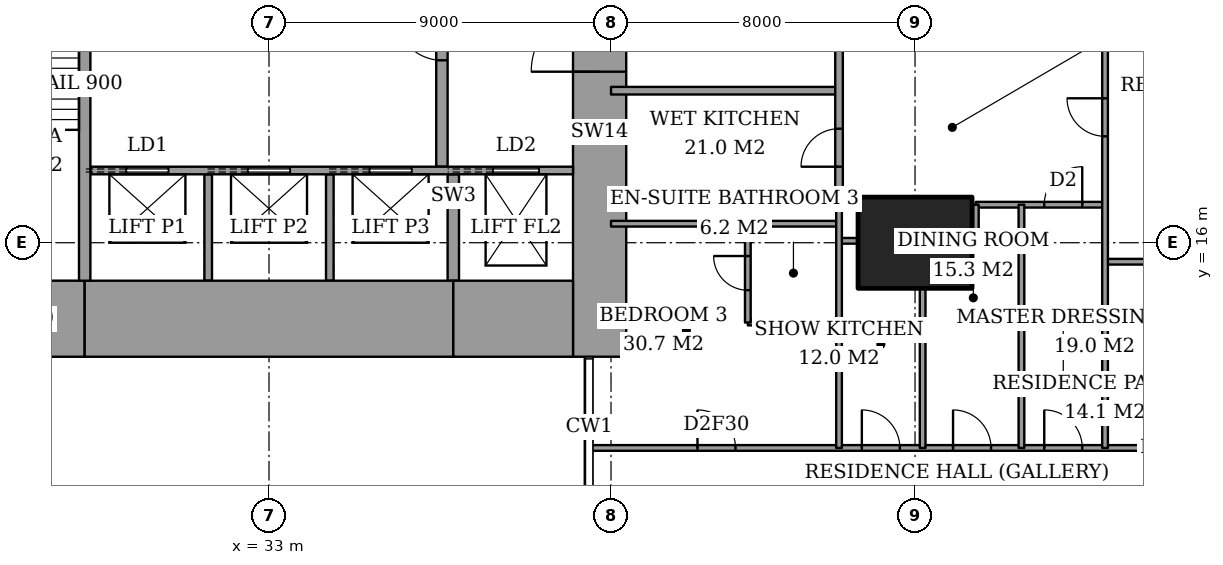
"""IFC4 building model, lengths in metres.
Left out: names, types, materials, properties, quantities, classifications, styles, units other than length and angle.
Written with IfcOpenShell. Run it as: python <this file> out.ifc"""

import sys

from ifc_helpers import new_model, si_unit, direction, frame, frame_2d, origin, origin_2d, place, context, subcontext, project, spatial, rectangle, extrude, element, fill, save


model = new_model("IFC4")
c1 = context("Model", 3, precision=1e-05, world=origin(), true_north=direction((0.0, 1.0)))
c2 = subcontext(c1, "Body", "Model", "MODEL_VIEW")
j1 = project(units=[si_unit("LENGTHUNIT", "METRE"), si_unit("PLANEANGLEUNIT", "RADIAN")], contexts=[c1])
p1 = place(None, origin())
s1 = spatial("IfcSite", under=j1, at=p1, CompositionType="ELEMENT")
p2 = place(p1, origin())
s2 = spatial("IfcBuilding", under=s1, at=p2, CompositionType="ELEMENT")
p3 = place(p2, frame((0.0, 0.0, 65.6)))
s3 = spatial("IfcBuildingStorey", under=s2, at=p3, CompositionType="ELEMENT", Elevation=65.6)
p4 = place(p3, frame((50.0, 16.0, 0.0), z_axis=(0.0, 0.0, 1.0), x_axis=(1.0, 0.0, 0.0)))
e1 = element("IfcColumn", 1, at=p4, inside=s3, PredefinedType="COLUMN", context=c2, shape_type="SweptSolid", body=[
    extrude(rectangle(XDim=3.0, YDim=2.4, at=origin_2d()), origin(), (0.0, 0.0, 1.0), 3.6),
])
p5 = place(p3, frame((25.0, 14.0, 0.0), z_axis=(0.0, 0.0, 1.0), x_axis=(1.0, 0.0, 0.0)))
e2 = element("IfcWall", 2, at=p5, inside=s3, PredefinedType="SHEAR", context=c2, shape_type="SweptSolid", body=[
    extrude(rectangle(XDim=3.15, YDim=2.0, at=frame_2d((1.575, 0.0))), origin(), (0.0, 0.0, 1.0), 3.6),
])
p6 = place(p3, frame((28.15, 14.0, 0.0), z_axis=(0.0, 0.0, 1.0), x_axis=(1.0, 0.0, 0.0)))
e3 = element("IfcWall", 3, at=p6, inside=s3, PredefinedType="SHEAR", context=c2, shape_type="SweptSolid", body=[
    extrude(rectangle(XDim=9.7, YDim=2.0, at=frame_2d((4.85, 0.0))), origin(), (0.0, 0.0, 1.0), 3.6),
])
p7 = place(p3, frame((37.85, 14.0, 0.0), z_axis=(0.0, 0.0, 1.0), x_axis=(1.0, 0.0, 0.0)))
e4 = element("IfcWall", 4, at=p7, inside=s3, PredefinedType="SHEAR", context=c2, shape_type="SweptSolid", body=[
    extrude(rectangle(XDim=3.15, YDim=2.0, at=frame_2d((1.575, 0.0))), origin(), (0.0, 0.0, 1.0), 3.6),
])
p8 = place(p3, frame((41.7, 13.0, 0.0), z_axis=(0.0, 0.0, 1.0), x_axis=(0.0, 1.0, 0.0)))
e5 = element("IfcWall", 5, at=p8, inside=s3, PredefinedType="SHEAR", context=c2, shape_type="SweptSolid", body=[
    extrude(rectangle(XDim=11.85, YDim=1.4, at=frame_2d((5.925, 0.0))), origin(), (0.0, 0.0, 1.0), 3.6),
])
p9 = place(p8, frame((7.5, 0.0, 0.0)))
e6 = element("IfcOpeningElement", 6, at=p9, cuts=e5, PredefinedType="OPENING", context=c2, shape_type="SweptSolid", body=[
    extrude(rectangle(XDim=1.8, YDim=2.4, at=frame_2d((0.9, 1.2))), frame((0.0, 0.71, 0.0), z_axis=(0.0, -1.0, 0.0), x_axis=(1.0, 0.0, 0.0)), (0.0, 0.0, 1.0), 1.42),
])
p10 = place(p3, frame((28.15, 15.0, 0.0), z_axis=(0.0, 0.0, 1.0), x_axis=(0.0, 1.0, 0.0)))
e7 = element("IfcWall", 7, at=p10, inside=s3, PredefinedType="SHEAR", context=c2, shape_type="SweptSolid", body=[
    extrude(rectangle(XDim=8.15, YDim=0.3, at=frame_2d((4.075, 0.0))), origin(), (0.0, 0.0, 1.0), 3.6),
])
p11 = place(p3, frame((37.55, 18.0, 0.0), z_axis=(0.0, 0.0, 1.0), x_axis=(0.0, 1.0, 0.0)))
e8 = element("IfcWall", 8, at=p11, inside=s3, PredefinedType="PARTITIONING", context=c2, shape_type="SweptSolid", body=[
    extrude(rectangle(XDim=6.7, YDim=0.3, at=frame_2d((3.35, 0.0))), origin(), (0.0, 0.0, 1.0), 3.6),
])
p12 = place(p11, frame((2.8, 0.0, 0.0)))
e9 = element("IfcOpeningElement", 9, at=p12, cuts=e8, PredefinedType="OPENING", context=c2, shape_type="SweptSolid", body=[
    extrude(rectangle(XDim=1.2, YDim=2.1, at=frame_2d((0.6, 1.05))), frame((0.0, 0.16, 0.0), z_axis=(0.0, -1.0, 0.0), x_axis=(1.0, 0.0, 0.0)), (0.0, 0.0, 1.0), 0.32),
])
p13 = place(p3, frame((41.439, 10.6, 0.0), z_axis=(0.0, 0.0, 1.0), x_axis=(1.0, 0.0, 0.0)))
e10 = element("IfcWall", 10, at=p13, inside=s3, PredefinedType="PARTITIONING", context=c2, shape_type="SweptSolid", body=[
    extrude(rectangle(XDim=25.011, YDim=0.15, at=frame_2d((12.505, 0.0))), origin(), (0.0, 0.0, 1.0), 3.35),
])
p14 = place(p13, frame((11.961, 0.0, 0.0)))
e11 = element("IfcOpeningElement", 11, at=p14, cuts=e10, PredefinedType="OPENING", context=c2, shape_type="SweptSolid", body=[
    extrude(rectangle(XDim=1.0, YDim=2.1, at=frame_2d((0.5, 1.05))), frame((0.0, 0.085, 0.0), z_axis=(0.0, -1.0, 0.0), x_axis=(1.0, 0.0, 0.0)), (0.0, 0.0, 1.0), 0.17),
])
p15 = place(p13, frame((20.924, 0.0, 0.0)))
e12 = element("IfcOpeningElement", 12, at=p15, cuts=e10, PredefinedType="OPENING", context=c2, shape_type="SweptSolid", body=[
    extrude(rectangle(XDim=1.0, YDim=2.1, at=frame_2d((0.5, 1.05))), frame((0.0, 0.085, 0.0), z_axis=(0.0, -1.0, 0.0), x_axis=(1.0, 0.0, 0.0)), (0.0, 0.0, 1.0), 0.17),
])
p16 = place(p13, frame((9.561, 0.0, 0.0)))
e13 = element("IfcOpeningElement", 13, at=p16, cuts=e10, PredefinedType="OPENING", context=c2, shape_type="SweptSolid", body=[
    extrude(rectangle(XDim=1.0, YDim=2.1, at=frame_2d((0.5, 1.05))), frame((0.0, 0.085, 0.0), z_axis=(0.0, -1.0, 0.0), x_axis=(1.0, 0.0, 0.0)), (0.0, 0.0, 1.0), 0.17),
])
p17 = place(p13, frame((7.161, 0.0, 0.0)))
e14 = element("IfcOpeningElement", 14, at=p17, cuts=e10, PredefinedType="OPENING", context=c2, shape_type="SweptSolid", body=[
    extrude(rectangle(XDim=1.0, YDim=2.1, at=frame_2d((0.5, 1.05))), frame((0.0, 0.085, 0.0), z_axis=(0.0, -1.0, 0.0), x_axis=(1.0, 0.0, 0.0)), (0.0, 0.0, 1.0), 0.17),
])
p18 = place(p13, frame((2.836, 0.0, 0.0)))
e15 = element("IfcOpeningElement", 15, at=p18, cuts=e10, PredefinedType="OPENING", context=c2, shape_type="SweptSolid", body=[
    extrude(rectangle(XDim=1.0, YDim=2.1, at=frame_2d((0.5, 1.05))), frame((0.0, 0.085, 0.0), z_axis=(0.0, -1.0, 0.0), x_axis=(1.0, 0.0, 0.0)), (0.0, 0.0, 1.0), 0.17),
])
p19 = place(p3, frame((45.6, 13.9, 0.0), z_axis=(0.0, 0.0, 1.0), x_axis=(1.0, 0.0, 0.0)))
e16 = element("IfcWall", 16, at=p19, inside=s3, PredefinedType="PARTITIONING", context=c2, shape_type="SweptSolid", body=[
    extrude(rectangle(XDim=2.4, YDim=0.15, at=frame_2d((1.2, 0.0))), origin(), (0.0, 0.0, 1.0), 3.35),
])
p20 = place(p3, frame((55.0, 15.5, 0.0), z_axis=(0.0, 0.0, 1.0), x_axis=(1.0, 0.0, 0.0)))
e17 = element("IfcWall", 17, at=p20, inside=s3, PredefinedType="PARTITIONING", context=c2, shape_type="SweptSolid", body=[
    extrude(rectangle(XDim=1.5, YDim=0.15, at=frame_2d((0.75, 0.0))), origin(), (0.0, 0.0, 1.0), 3.35),
])
p21 = place(p3, frame((48.0, 16.05, 0.0), z_axis=(0.0, 0.0, 1.0), x_axis=(1.0, 0.0, 0.0)))
e18 = element("IfcWall", 18, at=p21, inside=s3, PredefinedType="PARTITIONING", context=c2, shape_type="SweptSolid", body=[
    extrude(rectangle(XDim=0.5, YDim=0.15, at=frame_2d((0.25, 0.0))), origin(), (0.0, 0.0, 1.0), 2.634),
])
p22 = place(p3, frame((42.0, 16.5, 0.0), z_axis=(0.0, 0.0, 1.0), x_axis=(1.0, 0.0, 0.0)))
e19 = element("IfcWall", 19, at=p22, inside=s3, PredefinedType="PARTITIONING", context=c2, shape_type="SweptSolid", body=[
    extrude(rectangle(XDim=6.0, YDim=0.15, at=frame_2d((3.0, 0.0))), origin(), (0.0, 0.0, 1.0), 3.35),
])
p23 = place(p3, frame((51.6, 17.0, 0.0), z_axis=(0.0, 0.0, 1.0), x_axis=(1.0, 0.0, 0.0)))
e20 = element("IfcWall", 20, at=p23, inside=s3, PredefinedType="PARTITIONING", context=c2, shape_type="SweptSolid", body=[
    extrude(rectangle(XDim=3.4, YDim=0.15, at=frame_2d((1.7, 0.0))), origin(), (0.0, 0.0, 1.0), 3.35),
])
p24 = place(p23, frame((1.8, 0.0, 0.0)))
e21 = element("IfcOpeningElement", 21, at=p24, cuts=e20, PredefinedType="OPENING", context=c2, shape_type="SweptSolid", body=[
    extrude(rectangle(XDim=1.0, YDim=2.1, at=frame_2d((0.5, 1.05))), frame((0.0, 0.085, 0.0), z_axis=(0.0, -1.0, 0.0), x_axis=(1.0, 0.0, 0.0)), (0.0, 0.0, 1.0), 0.17),
])
p25 = place(p3, frame((42.0, 20.0, 0.0), z_axis=(0.0, 0.0, 1.0), x_axis=(1.0, 0.0, 0.0)))
e22 = element("IfcWall", 22, at=p25, inside=s3, PredefinedType="PARTITIONING", context=c2, shape_type="SweptSolid", body=[
    extrude(rectangle(XDim=6.0, YDim=0.2, at=frame_2d((3.0, 0.0))), origin(), (0.0, 0.0, 1.0), 3.35),
])
p26 = place(p3, frame((45.6, 13.9, 0.0), z_axis=(0.0, 0.0, 1.0), x_axis=(0.0, 1.0, 0.0)))
e23 = element("IfcWall", 23, at=p26, inside=s3, PredefinedType="PARTITIONING", context=c2, shape_type="SweptSolid", body=[
    extrude(rectangle(XDim=2.6, YDim=0.15, at=frame_2d((1.3, 0.0))), origin(), (0.0, 0.0, 1.0), 3.35),
])
p27 = place(p26, frame((0.85, 0.0, 0.0)))
e24 = element("IfcOpeningElement", 24, at=p27, cuts=e23, PredefinedType="OPENING", context=c2, shape_type="SweptSolid", body=[
    extrude(rectangle(XDim=0.9, YDim=2.1, at=frame_2d((0.45, 1.05))), frame((0.0, 0.085, 0.0), z_axis=(0.0, -1.0, 0.0), x_axis=(1.0, 0.0, 0.0)), (0.0, 0.0, 1.0), 0.17),
])
p28 = place(p3, frame((48.0, 17.0, 0.0), z_axis=(0.0, 0.0, 1.0), x_axis=(0.0, 1.0, 0.0)))
e25 = element("IfcWall", 25, at=p28, inside=s3, PredefinedType="PARTITIONING", context=c2, shape_type="SweptSolid", body=[
    extrude(rectangle(XDim=7.0, YDim=0.2, at=frame_2d((3.5, 0.0))), origin(), (0.0, 0.0, 1.0), 3.35),
])
p29 = place(p28, frame((4.4, 0.0, 0.0)))
e26 = element("IfcOpeningElement", 26, at=p29, cuts=e25, PredefinedType="OPENING", context=c2, shape_type="SweptSolid", body=[
    extrude(rectangle(XDim=1.2, YDim=2.4, at=frame_2d((0.6, 1.2))), frame((0.0, 0.11, 0.0), z_axis=(0.0, -1.0, 0.0), x_axis=(1.0, 0.0, 0.0)), (0.0, 0.0, 1.0), 0.22),
])
p30 = place(p28, frame((1.0, 0.0, 0.0)))
e27 = element("IfcOpeningElement", 27, at=p30, cuts=e25, PredefinedType="OPENING", context=c2, shape_type="SweptSolid", body=[
    extrude(rectangle(XDim=1.0, YDim=2.1, at=frame_2d((0.5, 1.05))), frame((0.0, 0.11, 0.0), z_axis=(0.0, -1.0, 0.0), x_axis=(1.0, 0.0, 0.0)), (0.0, 0.0, 1.0), 0.22),
])
p31 = place(p3, frame((48.0, 10.6, 0.0), z_axis=(0.0, 0.0, 1.0), x_axis=(0.0, 1.0, 0.0)))
e28 = element("IfcWall", 28, at=p31, inside=s3, PredefinedType="PARTITIONING", context=c2, shape_type="SweptSolid", body=[
    extrude(rectangle(XDim=6.4, YDim=0.15, at=frame_2d((3.2, 0.0))), origin(), (0.0, 0.0, 1.0), 3.35),
])
p32 = place(p3, frame((50.2, 10.6, 0.0), z_axis=(0.0, 0.0, 1.0), x_axis=(0.0, 1.0, 0.0)))
e29 = element("IfcWall", 29, at=p32, inside=s3, PredefinedType="PARTITIONING", context=c2, shape_type="SweptSolid", body=[
    extrude(rectangle(XDim=4.2, YDim=0.15, at=frame_2d((2.1, 0.0))), origin(), (0.0, 0.0, 1.0), 3.35),
])
p33 = place(p3, frame((51.6, 16.05, 0.0), z_axis=(0.0, 0.0, 1.0), x_axis=(0.0, 1.0, 0.0)))
e30 = element("IfcWall", 30, at=p33, inside=s3, PredefinedType="PARTITIONING", context=c2, shape_type="SweptSolid", body=[
    extrude(rectangle(XDim=0.95, YDim=0.15, at=frame_2d((0.475, 0.0))), origin(), (0.0, 0.0, 1.0), 3.35),
])
p34 = place(p3, frame((52.8, 10.6, 0.0), z_axis=(0.0, 0.0, 1.0), x_axis=(0.0, 1.0, 0.0)))
e31 = element("IfcWall", 31, at=p34, inside=s3, PredefinedType="PARTITIONING", context=c2, shape_type="SweptSolid", body=[
    extrude(rectangle(XDim=6.4, YDim=0.15, at=frame_2d((3.2, 0.0))), origin(), (0.0, 0.0, 1.0), 3.35),
])
p35 = place(p3, frame((55.0, 10.6, 0.0), z_axis=(0.0, 0.0, 1.0), x_axis=(0.0, 1.0, 0.0)))
e32 = element("IfcWall", 32, at=p35, inside=s3, PredefinedType="PARTITIONING", context=c2, shape_type="SweptSolid", body=[
    extrude(rectangle(XDim=11.0, YDim=0.15, at=frame_2d((5.5, 0.0))), origin(), (0.0, 0.0, 1.0), 3.35),
])
p36 = place(p35, frame((8.2, 0.0, 0.0)))
e33 = element("IfcOpeningElement", 33, at=p36, cuts=e32, PredefinedType="OPENING", context=c2, shape_type="SweptSolid", body=[
    extrude(rectangle(XDim=1.0, YDim=2.1, at=frame_2d((0.5, 1.05))), frame((0.0, 0.085, 0.0), z_axis=(0.0, -1.0, 0.0), x_axis=(1.0, 0.0, 0.0)), (0.0, 0.0, 1.0), 0.17),
])
p37 = place(p3, frame((28.3, 17.9, 0.0), z_axis=(0.0, 0.0, 1.0), x_axis=(1.0, 0.0, 0.0)))
e34 = element("IfcWall", 34, at=p37, inside=s3, PredefinedType="PARTITIONING", context=c2, shape_type="SweptSolid", body=[
    extrude(rectangle(XDim=12.7, YDim=0.2, at=frame_2d((6.35, 0.0))), origin(), (0.0, 0.0, 1.0), 3.6),
])
p38 = place(p37, frame((0.95, 0.0, 0.0)))
e35 = element("IfcOpeningElement", 35, at=p38, cuts=e34, PredefinedType="OPENING", context=c2, shape_type="SweptSolid", body=[
    extrude(rectangle(XDim=1.1, YDim=2.1, at=frame_2d((0.55, 1.05))), frame((0.0, 0.11, 0.0), z_axis=(0.0, -1.0, 0.0), x_axis=(1.0, 0.0, 0.0)), (0.0, 0.0, 1.0), 0.22),
])
p39 = place(p37, frame((4.15, 0.0, 0.0)))
e36 = element("IfcOpeningElement", 36, at=p39, cuts=e34, PredefinedType="OPENING", context=c2, shape_type="SweptSolid", body=[
    extrude(rectangle(XDim=1.1, YDim=2.1, at=frame_2d((0.55, 1.05))), frame((0.0, 0.11, 0.0), z_axis=(0.0, -1.0, 0.0), x_axis=(1.0, 0.0, 0.0)), (0.0, 0.0, 1.0), 0.22),
])
p40 = place(p37, frame((7.35, 0.0, 0.0)))
e37 = element("IfcOpeningElement", 37, at=p40, cuts=e34, PredefinedType="OPENING", context=c2, shape_type="SweptSolid", body=[
    extrude(rectangle(XDim=1.1, YDim=2.1, at=frame_2d((0.55, 1.05))), frame((0.0, 0.11, 0.0), z_axis=(0.0, -1.0, 0.0), x_axis=(1.0, 0.0, 0.0)), (0.0, 0.0, 1.0), 0.22),
])
p41 = place(p37, frame((10.6, 0.0, 0.0)))
e38 = element("IfcOpeningElement", 38, at=p41, cuts=e34, PredefinedType="OPENING", context=c2, shape_type="SweptSolid", body=[
    extrude(rectangle(XDim=1.2, YDim=2.1, at=frame_2d((0.6, 1.05))), frame((0.0, 0.11, 0.0), z_axis=(0.0, -1.0, 0.0), x_axis=(1.0, 0.0, 0.0)), (0.0, 0.0, 1.0), 0.22),
])
for number, where, z_axis, x_axis in (
    (39, (31.4, 15.0, 0.0), (0.0, 0.0, 1.0), (0.0, 1.0, 0.0)),
    (40, (34.6, 15.0, 0.0), (0.0, 0.0, 1.0), (0.0, 1.0, 0.0)),
):
    element("IfcWall", number, at=place(p3, frame(where, z_axis=z_axis, x_axis=x_axis)), inside=s3, PredefinedType="PARTITIONING", context=c2, shape_type="SweptSolid", body=[
        extrude(rectangle(XDim=2.8, YDim=0.2, at=frame_2d((1.4, 0.0))), origin(), (0.0, 0.0, 1.0), 3.6),
    ])
p42 = place(p3, frame((37.85, 15.0, 0.0), z_axis=(0.0, 0.0, 1.0), x_axis=(0.0, 1.0, 0.0)))
e41 = element("IfcWall", 41, at=p42, inside=s3, PredefinedType="SHEAR", context=c2, shape_type="SweptSolid", body=[
    extrude(rectangle(XDim=2.8, YDim=0.3, at=frame_2d((1.4, 0.0))), origin(), (0.0, 0.0, 1.0), 3.6),
])
p43 = place(p14, origin())
e42 = element("IfcDoor", 42, at=p43, inside=s3, OperationType="SINGLE_SWING_RIGHT", PredefinedType="DOOR", context=c2, shape_type="SweptSolid", body=[
    extrude(rectangle(XDim=1.0, YDim=2.1, at=frame_2d((0.5, 1.05))), frame((0.0, 0.025, 0.0), z_axis=(0.0, -1.0, 0.0), x_axis=(1.0, 0.0, 0.0)), (0.0, 0.0, 1.0), 0.05),
])
fill(e11, e42)
p44 = place(p36, origin())
e43 = element("IfcDoor", 43, at=p44, inside=s3, OperationType="SINGLE_SWING_LEFT", PredefinedType="DOOR", context=c2, shape_type="SweptSolid", body=[
    extrude(rectangle(XDim=1.0, YDim=2.1, at=frame_2d((0.5, 1.05))), frame((0.0, 0.025, 0.0), z_axis=(0.0, -1.0, 0.0), x_axis=(1.0, 0.0, 0.0)), (0.0, 0.0, 1.0), 0.05),
])
fill(e33, e43)
p45 = place(p24, origin())
e44 = element("IfcDoor", 44, at=p45, inside=s3, OperationType="SINGLE_SWING_LEFT", PredefinedType="DOOR", context=c2, shape_type="SweptSolid", body=[
    extrude(rectangle(XDim=1.0, YDim=2.1, at=frame_2d((0.5, 1.05))), frame((0.0, 0.025, 0.0), z_axis=(0.0, -1.0, 0.0), x_axis=(1.0, 0.0, 0.0)), (0.0, 0.0, 1.0), 0.05),
])
fill(e21, e44)
p46 = place(p16, origin())
e45 = element("IfcDoor", 45, at=p46, inside=s3, OperationType="SINGLE_SWING_RIGHT", PredefinedType="DOOR", context=c2, shape_type="SweptSolid", body=[
    extrude(rectangle(XDim=1.0, YDim=2.1, at=frame_2d((0.5, 1.05))), frame((0.0, 0.025, 0.0), z_axis=(0.0, -1.0, 0.0), x_axis=(1.0, 0.0, 0.0)), (0.0, 0.0, 1.0), 0.05),
])
fill(e13, e45)
p47 = place(p17, origin())
e46 = element("IfcDoor", 46, at=p47, inside=s3, OperationType="SINGLE_SWING_RIGHT", PredefinedType="DOOR", context=c2, shape_type="SweptSolid", body=[
    extrude(rectangle(XDim=1.0, YDim=2.1, at=frame_2d((0.5, 1.05))), frame((0.0, 0.025, 0.0), z_axis=(0.0, -1.0, 0.0), x_axis=(1.0, 0.0, 0.0)), (0.0, 0.0, 1.0), 0.05),
])
fill(e14, e46)
p48 = place(p27, origin())
e47 = element("IfcDoor", 47, at=p48, inside=s3, OperationType="SINGLE_SWING_LEFT", PredefinedType="DOOR", context=c2, shape_type="SweptSolid", body=[
    extrude(rectangle(XDim=0.9, YDim=2.1, at=frame_2d((0.45, 1.05))), frame((0.0, 0.025, 0.0), z_axis=(0.0, -1.0, 0.0), x_axis=(1.0, 0.0, 0.0)), (0.0, 0.0, 1.0), 0.05),
])
fill(e24, e47)
p49 = place(p18, origin())
e48 = element("IfcDoor", 48, at=p49, inside=s3, OperationType="SINGLE_SWING_RIGHT", PredefinedType="DOOR", context=c2, shape_type="SweptSolid", body=[
    extrude(rectangle(XDim=1.0, YDim=2.1, at=frame_2d((0.5, 1.05))), frame((0.0, 0.025, 0.0), z_axis=(0.0, -1.0, 0.0), x_axis=(1.0, 0.0, 0.0)), (0.0, 0.0, 1.0), 0.05),
])
fill(e15, e48)
p50 = place(p30, origin())
e49 = element("IfcDoor", 49, at=p50, inside=s3, OperationType="SINGLE_SWING_RIGHT", PredefinedType="DOOR", context=c2, shape_type="SweptSolid", body=[
    extrude(rectangle(XDim=1.0, YDim=2.1, at=frame_2d((0.5, 1.05))), frame((0.0, 0.025, 0.0), z_axis=(0.0, -1.0, 0.0), x_axis=(1.0, 0.0, 0.0)), (0.0, 0.0, 1.0), 0.05),
])
fill(e27, e49)
p51 = place(p12, origin())
e50 = element("IfcDoor", 50, at=p51, inside=s3, OperationType="SINGLE_SWING_LEFT", PredefinedType="DOOR", context=c2, shape_type="SweptSolid", body=[
    extrude(rectangle(XDim=1.2, YDim=2.1, at=frame_2d((0.6, 1.05))), frame((0.0, 0.025, 0.0), z_axis=(0.0, -1.0, 0.0), x_axis=(1.0, 0.0, 0.0)), (0.0, 0.0, 1.0), 0.05),
])
fill(e9, e50)
p52 = place(p9, origin())
e51 = element("IfcDoor", 51, at=p52, inside=s3, OperationType="DOUBLE_DOOR_DOUBLE_SWING", PredefinedType="DOOR", context=c2, shape_type="SweptSolid", body=[
    extrude(rectangle(XDim=1.8, YDim=2.4, at=frame_2d((0.9, 1.2))), frame((0.0, 0.025, 0.0), z_axis=(0.0, -1.0, 0.0), x_axis=(1.0, 0.0, 0.0)), (0.0, 0.0, 1.0), 0.05),
])
fill(e6, e51)
p53 = place(p38, origin())
e52 = element("IfcDoor", 52, at=p53, inside=s3, OperationType="SLIDING_TO_LEFT", PredefinedType="DOOR", context=c2, shape_type="SweptSolid", body=[
    extrude(rectangle(XDim=1.1, YDim=2.1, at=frame_2d((0.55, 1.05))), frame((0.0, 0.025, 0.0), z_axis=(0.0, -1.0, 0.0), x_axis=(1.0, 0.0, 0.0)), (0.0, 0.0, 1.0), 0.05),
])
fill(e35, e52)
p54 = place(p39, origin())
e53 = element("IfcDoor", 53, at=p54, inside=s3, OperationType="SLIDING_TO_LEFT", PredefinedType="DOOR", context=c2, shape_type="SweptSolid", body=[
    extrude(rectangle(XDim=1.1, YDim=2.1, at=frame_2d((0.55, 1.05))), frame((0.0, 0.025, 0.0), z_axis=(0.0, -1.0, 0.0), x_axis=(1.0, 0.0, 0.0)), (0.0, 0.0, 1.0), 0.05),
])
fill(e36, e53)
p55 = place(p40, origin())
e54 = element("IfcDoor", 54, at=p55, inside=s3, OperationType="SLIDING_TO_LEFT", PredefinedType="DOOR", context=c2, shape_type="SweptSolid", body=[
    extrude(rectangle(XDim=1.1, YDim=2.1, at=frame_2d((0.55, 1.05))), frame((0.0, 0.025, 0.0), z_axis=(0.0, -1.0, 0.0), x_axis=(1.0, 0.0, 0.0)), (0.0, 0.0, 1.0), 0.05),
])
fill(e37, e54)
p56 = place(p41, origin())
e55 = element("IfcDoor", 55, at=p56, inside=s3, OperationType="SLIDING_TO_LEFT", PredefinedType="DOOR", context=c2, shape_type="SweptSolid", body=[
    extrude(rectangle(XDim=1.2, YDim=2.1, at=frame_2d((0.6, 1.05))), frame((0.0, 0.025, 0.0), z_axis=(0.0, -1.0, 0.0), x_axis=(1.0, 0.0, 0.0)), (0.0, 0.0, 1.0), 0.05),
])
fill(e38, e55)
save(model, sys.argv[1])
